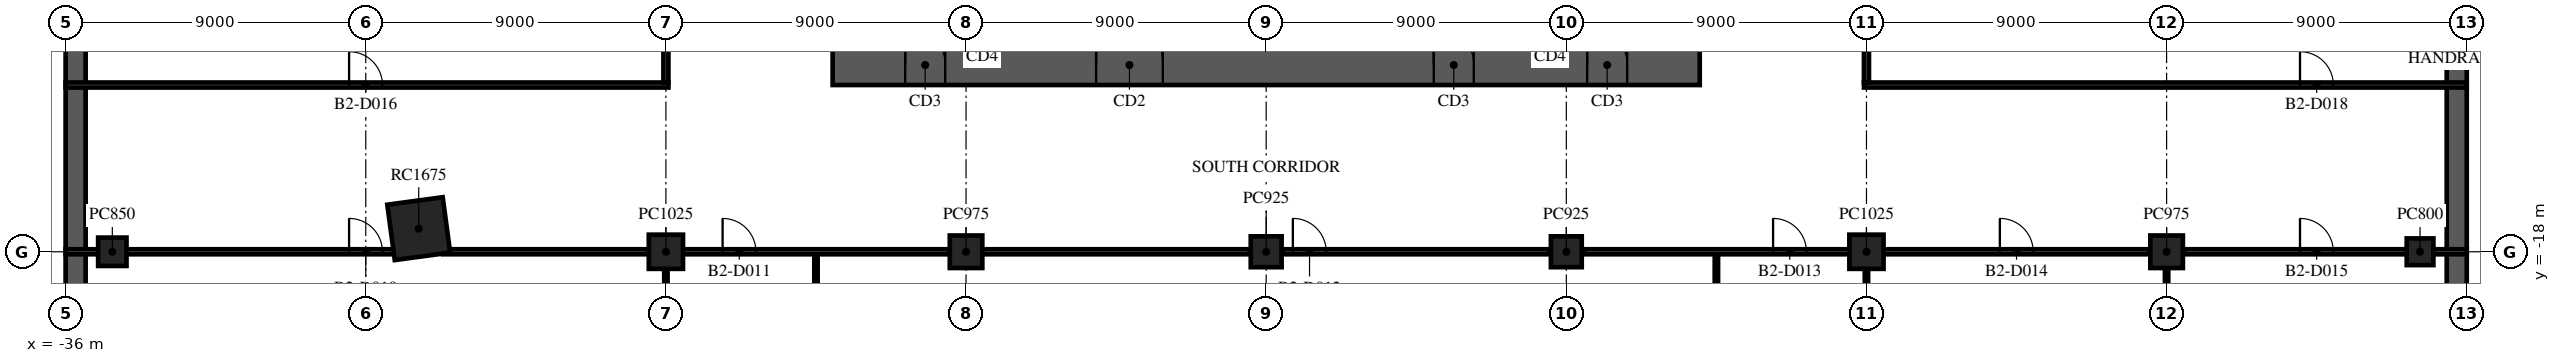
"""IFC4 building model, lengths in metres.
Left out: names, types, materials, properties, quantities, classifications, styles, units other than length and angle.
Written with IfcOpenShell. Run it as: python <this file> out.ifc"""

import sys

from ifc_helpers import new_model, si_unit, direction, frame, frame_2d, origin, origin_2d, place, context, subcontext, project, spatial, rectangle, extrude, element, fill, save


model = new_model("IFC4")
c1 = context("Model", 3, precision=1e-05, world=origin(), true_north=direction((0.0, 1.0)))
c2 = subcontext(c1, "Body", "Model", "MODEL_VIEW")
j1 = project(units=[si_unit("LENGTHUNIT", "METRE"), si_unit("PLANEANGLEUNIT", "RADIAN")], contexts=[c1])
p1 = place(None, origin())
s1 = spatial("IfcSite", under=j1, at=p1, CompositionType="ELEMENT")
p2 = place(p1, origin())
s2 = spatial("IfcBuilding", under=s1, at=p2, CompositionType="ELEMENT")
p3 = place(p2, frame((0.0, 0.0, -9.0)))
s3 = spatial("IfcBuildingStorey", under=s2, at=p3, CompositionType="ELEMENT", Elevation=-9.0)
for number, where, z_axis, x_axis in (
    (1, (35.7, -31.0, -0.3), (0.0, 0.0, 1.0), (0.0, 1.0, 0.0)),
    (2, (-35.7, 31.0, -0.3), (0.0, 0.0, 1.0), (0.0, -1.0, 0.0)),
):
    element("IfcWall", number, at=place(p3, frame(where, z_axis=z_axis, x_axis=x_axis)), inside=s3, PredefinedType="SOLIDWALL", context=c2, shape_type="SweptSolid", body=[
        extrude(rectangle(XDim=62.0, YDim=0.6, at=frame_2d((31.0, 0.0))), origin(), (0.0, 0.0, 1.0), 4.5),
    ])
p4 = place(p3, frame((-34.6, -18.0, -0.3), z_axis=(0.0, 0.0, 1.0), x_axis=(1.0, 0.0, 0.0)))
e3 = element("IfcColumn", 3, at=p4, inside=s3, PredefinedType="COLUMN", context=c2, shape_type="SweptSolid", body=[
    extrude(rectangle(XDim=0.85, YDim=0.85, at=origin_2d()), origin(), (0.0, 0.0, 1.0), 4.8),
])
p5 = place(p3, frame((-18.0, -18.0, -0.3), z_axis=(0.0, 0.0, 1.0), x_axis=(1.0, 0.0, 0.0)))
e4 = element("IfcColumn", 4, at=p5, inside=s3, PredefinedType="COLUMN", context=c2, shape_type="SweptSolid", body=[
    extrude(rectangle(XDim=1.025, YDim=1.025, at=origin_2d()), origin(), (0.0, 0.0, 1.0), 4.8),
])
p6 = place(p3, frame((-9.0, -18.0, -0.3), z_axis=(0.0, 0.0, 1.0), x_axis=(1.0, 0.0, 0.0)))
e5 = element("IfcColumn", 5, at=p6, inside=s3, PredefinedType="COLUMN", context=c2, shape_type="SweptSolid", body=[
    extrude(rectangle(XDim=0.975, YDim=0.975, at=origin_2d()), origin(), (0.0, 0.0, 1.0), 4.8),
])
for number, where, z_axis, x_axis in (
    (6, (0.0, -18.0, -0.3), (0.0, 0.0, 1.0), (1.0, 0.0, 0.0)),
    (7, (9.0, -18.0, -0.3), (0.0, 0.0, 1.0), (1.0, 0.0, 0.0)),
):
    element("IfcColumn", number, at=place(p3, frame(where, z_axis=z_axis, x_axis=x_axis)), inside=s3, PredefinedType="COLUMN", context=c2, shape_type="SweptSolid", body=[
        extrude(rectangle(XDim=0.925, YDim=0.925, at=origin_2d()), origin(), (0.0, 0.0, 1.0), 4.8),
    ])
p7 = place(p3, frame((18.0, -18.0, -0.3), z_axis=(0.0, 0.0, 1.0), x_axis=(1.0, 0.0, 0.0)))
e8 = element("IfcColumn", 8, at=p7, inside=s3, PredefinedType="COLUMN", context=c2, shape_type="SweptSolid", body=[
    extrude(rectangle(XDim=1.025, YDim=1.025, at=origin_2d()), origin(), (0.0, 0.0, 1.0), 4.8),
])
p8 = place(p3, frame((27.0, -18.0, -0.3), z_axis=(0.0, 0.0, 1.0), x_axis=(1.0, 0.0, 0.0)))
e9 = element("IfcColumn", 9, at=p8, inside=s3, PredefinedType="COLUMN", context=c2, shape_type="SweptSolid", body=[
    extrude(rectangle(XDim=0.975, YDim=0.975, at=origin_2d()), origin(), (0.0, 0.0, 1.0), 4.8),
])
p9 = place(p3, frame((34.6, -18.0, -0.3), z_axis=(0.0, 0.0, 1.0), x_axis=(1.0, 0.0, 0.0)))
e10 = element("IfcColumn", 10, at=p9, inside=s3, PredefinedType="COLUMN", context=c2, shape_type="SweptSolid", body=[
    extrude(rectangle(XDim=0.8, YDim=0.8, at=origin_2d()), origin(), (0.0, 0.0, 1.0), 4.8),
])
p10 = place(p3, frame((-25.412, -17.307, -0.3), z_axis=(0.0, 0.0, 1.0), x_axis=(0.991001197216, 0.133853005627, 0.0)))
e11 = element("IfcColumn", 11, at=p10, inside=s3, PredefinedType="COLUMN", context=c2, shape_type="SweptSolid", body=[
    extrude(rectangle(XDim=1.675, YDim=1.675, at=origin_2d()), origin(), (0.0, 0.0, 1.0), 4.8),
])
p11 = place(p3, frame((-13.0, -12.4, 0.0), z_axis=(0.0, 0.0, 1.0), x_axis=(1.0, 0.0, 0.0)))
e12 = element("IfcWall", 12, at=p11, inside=s3, PredefinedType="SHEAR", context=c2, shape_type="SweptSolid", body=[
    extrude(rectangle(XDim=26.0, YDim=1.2, at=frame_2d((13.0, 0.0))), origin(), (0.0, 0.0, 1.0), 4.2),
])
p12 = place(p11, frame((7.9, 0.0, 0.0)))
e13 = element("IfcOpeningElement", 13, at=p12, cuts=e12, PredefinedType="OPENING", context=c2, shape_type="SweptSolid", body=[
    extrude(rectangle(XDim=2.0, YDim=2.1, at=frame_2d((1.0, 1.05))), frame((0.0, 0.61, 0.0), z_axis=(0.0, -1.0, 0.0), x_axis=(1.0, 0.0, 0.0)), (0.0, 0.0, 1.0), 1.22),
])
p13 = place(p11, frame((18.025, 0.0, 0.0)))
e14 = element("IfcOpeningElement", 14, at=p13, cuts=e12, PredefinedType="OPENING", context=c2, shape_type="SweptSolid", body=[
    extrude(rectangle(XDim=1.2, YDim=2.1, at=frame_2d((0.6, 1.05))), frame((0.0, 0.61, 0.0), z_axis=(0.0, -1.0, 0.0), x_axis=(1.0, 0.0, 0.0)), (0.0, 0.0, 1.0), 1.22),
])
p14 = place(p11, frame((2.175, 0.0, 0.0)))
e15 = element("IfcOpeningElement", 15, at=p14, cuts=e12, PredefinedType="OPENING", context=c2, shape_type="SweptSolid", body=[
    extrude(rectangle(XDim=1.2, YDim=2.1, at=frame_2d((0.6, 1.05))), frame((0.0, 0.61, 0.0), z_axis=(0.0, -1.0, 0.0), x_axis=(1.0, 0.0, 0.0)), (0.0, 0.0, 1.0), 1.22),
])
p15 = place(p11, frame((22.625, 0.0, 0.0)))
e16 = element("IfcOpeningElement", 16, at=p15, cuts=e12, PredefinedType="OPENING", context=c2, shape_type="SweptSolid", body=[
    extrude(rectangle(XDim=1.2, YDim=2.1, at=frame_2d((0.6, 1.05))), frame((0.0, 0.61, 0.0), z_axis=(0.0, -1.0, 0.0), x_axis=(1.0, 0.0, 0.0)), (0.0, 0.0, 1.0), 1.22),
])
p16 = place(p3, frame((-36.0, -18.0, 0.0), z_axis=(0.0, 0.0, 1.0), x_axis=(1.0, 0.0, 0.0)))
e17 = element("IfcWall", 17, at=p16, inside=s3, PredefinedType="PARTITIONING", context=c2, shape_type="SweptSolid", body=[
    extrude(rectangle(XDim=9.857, YDim=0.15, at=frame_2d((4.928, 0.0))), origin(), (0.0, 0.0, 1.0), 4.2),
])
p17 = place(p16, frame((8.5, 0.0, 0.0)))
e18 = element("IfcOpeningElement", 18, at=p17, cuts=e17, PredefinedType="OPENING", context=c2, shape_type="SweptSolid", body=[
    extrude(rectangle(XDim=1.0, YDim=2.1, at=frame_2d((0.5, 1.05))), frame((0.0, 0.085, 0.0), z_axis=(0.0, -1.0, 0.0), x_axis=(1.0, 0.0, 0.0)), (0.0, 0.0, 1.0), 0.17),
])
p18 = place(p3, frame((-24.681, -18.0, 0.0), z_axis=(0.0, 0.0, 1.0), x_axis=(1.0, 0.0, 0.0)))
e19 = element("IfcWall", 19, at=p18, inside=s3, PredefinedType="PARTITIONING", context=c2, shape_type="SweptSolid", body=[
    extrude(rectangle(XDim=6.181, YDim=0.15, at=frame_2d((3.09, 0.0))), origin(), (0.0, 0.0, 1.0), 4.2),
])
p19 = place(p3, frame((-17.5, -18.0, 0.0), z_axis=(0.0, 0.0, 1.0), x_axis=(1.0, 0.0, 0.0)))
e20 = element("IfcWall", 20, at=p19, inside=s3, PredefinedType="PARTITIONING", context=c2, shape_type="SweptSolid", body=[
    extrude(rectangle(XDim=8.0, YDim=0.15, at=frame_2d((4.0, 0.0))), origin(), (0.0, 0.0, 1.0), 4.2),
])
p20 = place(p19, frame((1.2, 0.0, 0.0)))
e21 = element("IfcOpeningElement", 21, at=p20, cuts=e20, PredefinedType="OPENING", context=c2, shape_type="SweptSolid", body=[
    extrude(rectangle(XDim=1.0, YDim=2.1, at=frame_2d((0.5, 1.05))), frame((0.0, 0.085, 0.0), z_axis=(0.0, -1.0, 0.0), x_axis=(1.0, 0.0, 0.0)), (0.0, 0.0, 1.0), 0.17),
])
p21 = place(p3, frame((-8.5, -18.0, 0.0), z_axis=(0.0, 0.0, 1.0), x_axis=(1.0, 0.0, 0.0)))
e22 = element("IfcWall", 22, at=p21, inside=s3, PredefinedType="PARTITIONING", context=c2, shape_type="SweptSolid", body=[
    extrude(rectangle(XDim=8.0, YDim=0.15, at=frame_2d((4.0, 0.0))), origin(), (0.0, 0.0, 1.0), 4.2),
])
p22 = place(p3, frame((0.5, -18.0, 0.0), z_axis=(0.0, 0.0, 1.0), x_axis=(1.0, 0.0, 0.0)))
e23 = element("IfcWall", 23, at=p22, inside=s3, PredefinedType="PARTITIONING", context=c2, shape_type="SweptSolid", body=[
    extrude(rectangle(XDim=8.0, YDim=0.15, at=frame_2d((4.0, 0.0))), origin(), (0.0, 0.0, 1.0), 4.2),
])
p23 = place(p22, frame((0.3, 0.0, 0.0)))
e24 = element("IfcOpeningElement", 24, at=p23, cuts=e23, PredefinedType="OPENING", context=c2, shape_type="SweptSolid", body=[
    extrude(rectangle(XDim=1.0, YDim=2.1, at=frame_2d((0.5, 1.05))), frame((0.0, 0.085, 0.0), z_axis=(0.0, -1.0, 0.0), x_axis=(1.0, 0.0, 0.0)), (0.0, 0.0, 1.0), 0.17),
])
p24 = place(p3, frame((9.5, -18.0, 0.0), z_axis=(0.0, 0.0, 1.0), x_axis=(1.0, 0.0, 0.0)))
e25 = element("IfcWall", 25, at=p24, inside=s3, PredefinedType="PARTITIONING", context=c2, shape_type="SweptSolid", body=[
    extrude(rectangle(XDim=8.0, YDim=0.15, at=frame_2d((4.0, 0.0))), origin(), (0.0, 0.0, 1.0), 4.2),
])
p25 = place(p24, frame((5.7, 0.0, 0.0)))
e26 = element("IfcOpeningElement", 26, at=p25, cuts=e25, PredefinedType="OPENING", context=c2, shape_type="SweptSolid", body=[
    extrude(rectangle(XDim=1.0, YDim=2.1, at=frame_2d((0.5, 1.05))), frame((0.0, 0.085, 0.0), z_axis=(0.0, -1.0, 0.0), x_axis=(1.0, 0.0, 0.0)), (0.0, 0.0, 1.0), 0.17),
])
p26 = place(p3, frame((18.5, -18.0, 0.0), z_axis=(0.0, 0.0, 1.0), x_axis=(1.0, 0.0, 0.0)))
e27 = element("IfcWall", 27, at=p26, inside=s3, PredefinedType="PARTITIONING", context=c2, shape_type="SweptSolid", body=[
    extrude(rectangle(XDim=8.0, YDim=0.15, at=frame_2d((4.0, 0.0))), origin(), (0.0, 0.0, 1.0), 4.2),
])
p27 = place(p26, frame((3.5, 0.0, 0.0)))
e28 = element("IfcOpeningElement", 28, at=p27, cuts=e27, PredefinedType="OPENING", context=c2, shape_type="SweptSolid", body=[
    extrude(rectangle(XDim=1.0, YDim=2.1, at=frame_2d((0.5, 1.05))), frame((0.0, 0.085, 0.0), z_axis=(0.0, -1.0, 0.0), x_axis=(1.0, 0.0, 0.0)), (0.0, 0.0, 1.0), 0.17),
])
p28 = place(p3, frame((27.5, -18.0, 0.0), z_axis=(0.0, 0.0, 1.0), x_axis=(1.0, 0.0, 0.0)))
e29 = element("IfcWall", 29, at=p28, inside=s3, PredefinedType="PARTITIONING", context=c2, shape_type="SweptSolid", body=[
    extrude(rectangle(XDim=8.5, YDim=0.15, at=frame_2d((4.25, 0.0))), origin(), (0.0, 0.0, 1.0), 4.2),
])
p29 = place(p28, frame((3.5, 0.0, 0.0)))
e30 = element("IfcOpeningElement", 30, at=p29, cuts=e29, PredefinedType="OPENING", context=c2, shape_type="SweptSolid", body=[
    extrude(rectangle(XDim=1.0, YDim=2.1, at=frame_2d((0.5, 1.05))), frame((0.0, 0.085, 0.0), z_axis=(0.0, -1.0, 0.0), x_axis=(1.0, 0.0, 0.0)), (0.0, 0.0, 1.0), 0.17),
])
p30 = place(p3, frame((-36.0, -13.0, 0.0), z_axis=(0.0, 0.0, 1.0), x_axis=(1.0, 0.0, 0.0)))
e31 = element("IfcWall", 31, at=p30, inside=s3, PredefinedType="PARTITIONING", context=c2, shape_type="SweptSolid", body=[
    extrude(rectangle(XDim=18.075, YDim=0.15, at=frame_2d((9.038, 0.0))), origin(), (0.0, 0.0, 1.0), 4.2),
])
p31 = place(p30, frame((8.5, 0.0, 0.0)))
e32 = element("IfcOpeningElement", 32, at=p31, cuts=e31, PredefinedType="OPENING", context=c2, shape_type="SweptSolid", body=[
    extrude(rectangle(XDim=1.0, YDim=2.1, at=frame_2d((0.5, 1.05))), frame((0.0, 0.085, 0.0), z_axis=(0.0, -1.0, 0.0), x_axis=(1.0, 0.0, 0.0)), (0.0, 0.0, 1.0), 0.17),
])
p32 = place(p3, frame((17.925, -13.0, 0.0), z_axis=(0.0, 0.0, 1.0), x_axis=(1.0, 0.0, 0.0)))
e33 = element("IfcWall", 33, at=p32, inside=s3, PredefinedType="PARTITIONING", context=c2, shape_type="SweptSolid", body=[
    extrude(rectangle(XDim=18.075, YDim=0.15, at=frame_2d((9.038, 0.0))), origin(), (0.0, 0.0, 1.0), 4.2),
])
p33 = place(p32, frame((13.075, 0.0, 0.0)))
e34 = element("IfcOpeningElement", 34, at=p33, cuts=e33, PredefinedType="OPENING", context=c2, shape_type="SweptSolid", body=[
    extrude(rectangle(XDim=1.0, YDim=2.1, at=frame_2d((0.5, 1.05))), frame((0.0, 0.085, 0.0), z_axis=(0.0, -1.0, 0.0), x_axis=(1.0, 0.0, 0.0)), (0.0, 0.0, 1.0), 0.17),
])
p34 = place(p3, frame((-18.0, -26.5, 0.0), z_axis=(0.0, 0.0, 1.0), x_axis=(0.0, 1.0, 0.0)))
e35 = element("IfcWall", 35, at=p34, inside=s3, PredefinedType="PARTITIONING", context=c2, shape_type="SweptSolid", body=[
    extrude(rectangle(XDim=8.0, YDim=0.1, at=frame_2d((4.0, 0.0))), origin(), (0.0, 0.0, 1.0), 4.2),
])
p35 = place(p3, frame((-18.0, -12.925, 0.0), z_axis=(0.0, 0.0, 1.0), x_axis=(0.0, 1.0, 0.0)))
e36 = element("IfcWall", 36, at=p35, inside=s3, PredefinedType="PARTITIONING", context=c2, shape_type="SweptSolid", body=[
    extrude(rectangle(XDim=3.425, YDim=0.15, at=frame_2d((1.712, 0.0))), origin(), (0.0, 0.0, 1.0), 4.2),
])
for number, where, z_axis, x_axis in (
    (37, (-13.5, -36.0, 0.0), (0.0, 0.0, 1.0), (0.0, 1.0, 0.0)),
    (38, (13.5, -36.0, 0.0), (0.0, 0.0, 1.0), (0.0, 1.0, 0.0)),
):
    element("IfcWall", number, at=place(p3, frame(where, z_axis=z_axis, x_axis=x_axis)), inside=s3, PredefinedType="PARTITIONING", context=c2, shape_type="SweptSolid", body=[
        extrude(rectangle(XDim=17.925, YDim=0.1, at=frame_2d((8.962, 0.0))), origin(), (0.0, 0.0, 1.0), 4.2),
    ])
p36 = place(p3, frame((18.0, -24.681, 0.0), z_axis=(0.0, 0.0, 1.0), x_axis=(0.0, 1.0, 0.0)))
e39 = element("IfcWall", 39, at=p36, inside=s3, PredefinedType="PARTITIONING", context=c2, shape_type="SweptSolid", body=[
    extrude(rectangle(XDim=6.181, YDim=0.1, at=frame_2d((3.09, 0.0))), origin(), (0.0, 0.0, 1.0), 4.2),
])
p37 = place(p3, frame((18.0, -12.925, 0.0), z_axis=(0.0, 0.0, 1.0), x_axis=(0.0, 1.0, 0.0)))
e40 = element("IfcWall", 40, at=p37, inside=s3, PredefinedType="PARTITIONING", context=c2, shape_type="SweptSolid", body=[
    extrude(rectangle(XDim=3.425, YDim=0.15, at=frame_2d((1.712, 0.0))), origin(), (0.0, 0.0, 1.0), 4.2),
])
p38 = place(p3, frame((27.0, -19.742, 0.0), z_axis=(0.0, 0.0, 1.0), x_axis=(0.0, 1.0, 0.0)))
e41 = element("IfcWall", 41, at=p38, inside=s3, PredefinedType="PARTITIONING", context=c2, shape_type="SweptSolid", body=[
    extrude(rectangle(XDim=1.242, YDim=0.1, at=frame_2d((0.621, 0.0))), origin(), (0.0, 0.0, 1.0), 4.2),
])
p39 = place(p12, origin())
e42 = element("IfcDoor", 42, at=p39, inside=s3, OperationType="SINGLE_SWING_LEFT", PredefinedType="DOOR", context=c2, shape_type="SweptSolid", body=[
    extrude(rectangle(XDim=2.0, YDim=2.1, at=frame_2d((1.0, 1.05))), frame((0.0, 0.025, 0.0), z_axis=(0.0, -1.0, 0.0), x_axis=(1.0, 0.0, 0.0)), (0.0, 0.0, 1.0), 0.05),
])
fill(e13, e42)
p40 = place(p13, origin())
e43 = element("IfcDoor", 43, at=p40, inside=s3, OperationType="SINGLE_SWING_LEFT", PredefinedType="DOOR", context=c2, shape_type="SweptSolid", body=[
    extrude(rectangle(XDim=1.2, YDim=2.1, at=frame_2d((0.6, 1.05))), frame((0.0, 0.025, 0.0), z_axis=(0.0, -1.0, 0.0), x_axis=(1.0, 0.0, 0.0)), (0.0, 0.0, 1.0), 0.05),
])
fill(e14, e43)
p41 = place(p14, origin())
e44 = element("IfcDoor", 44, at=p41, inside=s3, OperationType="SINGLE_SWING_LEFT", PredefinedType="DOOR", context=c2, shape_type="SweptSolid", body=[
    extrude(rectangle(XDim=1.2, YDim=2.1, at=frame_2d((0.6, 1.05))), frame((0.0, 0.025, 0.0), z_axis=(0.0, -1.0, 0.0), x_axis=(1.0, 0.0, 0.0)), (0.0, 0.0, 1.0), 0.05),
])
fill(e15, e44)
p42 = place(p15, origin())
e45 = element("IfcDoor", 45, at=p42, inside=s3, OperationType="SINGLE_SWING_LEFT", PredefinedType="DOOR", context=c2, shape_type="SweptSolid", body=[
    extrude(rectangle(XDim=1.2, YDim=2.1, at=frame_2d((0.6, 1.05))), frame((0.0, 0.025, 0.0), z_axis=(0.0, -1.0, 0.0), x_axis=(1.0, 0.0, 0.0)), (0.0, 0.0, 1.0), 0.05),
])
fill(e16, e45)
p43 = place(p17, origin())
e46 = element("IfcDoor", 46, at=p43, inside=s3, OperationType="SINGLE_SWING_RIGHT", PredefinedType="DOOR", context=c2, shape_type="SweptSolid", body=[
    extrude(rectangle(XDim=1.0, YDim=2.1, at=frame_2d((0.5, 1.05))), frame((0.0, 0.025, 0.0), z_axis=(0.0, -1.0, 0.0), x_axis=(1.0, 0.0, 0.0)), (0.0, 0.0, 1.0), 0.05),
])
fill(e18, e46)
p44 = place(p20, origin())
e47 = element("IfcDoor", 47, at=p44, inside=s3, OperationType="SINGLE_SWING_LEFT", PredefinedType="DOOR", context=c2, shape_type="SweptSolid", body=[
    extrude(rectangle(XDim=1.0, YDim=2.1, at=frame_2d((0.5, 1.05))), frame((0.0, 0.025, 0.0), z_axis=(0.0, -1.0, 0.0), x_axis=(1.0, 0.0, 0.0)), (0.0, 0.0, 1.0), 0.05),
])
fill(e21, e47)
p45 = place(p23, origin())
e48 = element("IfcDoor", 48, at=p45, inside=s3, OperationType="SINGLE_SWING_RIGHT", PredefinedType="DOOR", context=c2, shape_type="SweptSolid", body=[
    extrude(rectangle(XDim=1.0, YDim=2.1, at=frame_2d((0.5, 1.05))), frame((0.0, 0.025, 0.0), z_axis=(0.0, -1.0, 0.0), x_axis=(1.0, 0.0, 0.0)), (0.0, 0.0, 1.0), 0.05),
])
fill(e24, e48)
p46 = place(p25, origin())
e49 = element("IfcDoor", 49, at=p46, inside=s3, OperationType="SINGLE_SWING_LEFT", PredefinedType="DOOR", context=c2, shape_type="SweptSolid", body=[
    extrude(rectangle(XDim=1.0, YDim=2.1, at=frame_2d((0.5, 1.05))), frame((0.0, 0.025, 0.0), z_axis=(0.0, -1.0, 0.0), x_axis=(1.0, 0.0, 0.0)), (0.0, 0.0, 1.0), 0.05),
])
fill(e26, e49)
p47 = place(p27, origin())
e50 = element("IfcDoor", 50, at=p47, inside=s3, OperationType="SINGLE_SWING_RIGHT", PredefinedType="DOOR", context=c2, shape_type="SweptSolid", body=[
    extrude(rectangle(XDim=1.0, YDim=2.1, at=frame_2d((0.5, 1.05))), frame((0.0, 0.025, 0.0), z_axis=(0.0, -1.0, 0.0), x_axis=(1.0, 0.0, 0.0)), (0.0, 0.0, 1.0), 0.05),
])
fill(e28, e50)
p48 = place(p29, origin())
e51 = element("IfcDoor", 51, at=p48, inside=s3, OperationType="SINGLE_SWING_LEFT", PredefinedType="DOOR", context=c2, shape_type="SweptSolid", body=[
    extrude(rectangle(XDim=1.0, YDim=2.1, at=frame_2d((0.5, 1.05))), frame((0.0, 0.025, 0.0), z_axis=(0.0, -1.0, 0.0), x_axis=(1.0, 0.0, 0.0)), (0.0, 0.0, 1.0), 0.05),
])
fill(e30, e51)
p49 = place(p31, origin())
e52 = element("IfcDoor", 52, at=p49, inside=s3, OperationType="SINGLE_SWING_RIGHT", PredefinedType="DOOR", context=c2, shape_type="SweptSolid", body=[
    extrude(rectangle(XDim=1.0, YDim=2.1, at=frame_2d((0.5, 1.05))), frame((0.0, 0.025, 0.0), z_axis=(0.0, -1.0, 0.0), x_axis=(1.0, 0.0, 0.0)), (0.0, 0.0, 1.0), 0.05),
])
fill(e32, e52)
p50 = place(p33, origin())
e53 = element("IfcDoor", 53, at=p50, inside=s3, OperationType="SINGLE_SWING_RIGHT", PredefinedType="DOOR", context=c2, shape_type="SweptSolid", body=[
    extrude(rectangle(XDim=1.0, YDim=2.1, at=frame_2d((0.5, 1.05))), frame((0.0, 0.025, 0.0), z_axis=(0.0, -1.0, 0.0), x_axis=(1.0, 0.0, 0.0)), (0.0, 0.0, 1.0), 0.05),
])
fill(e34, e53)
save(model, sys.argv[1])
